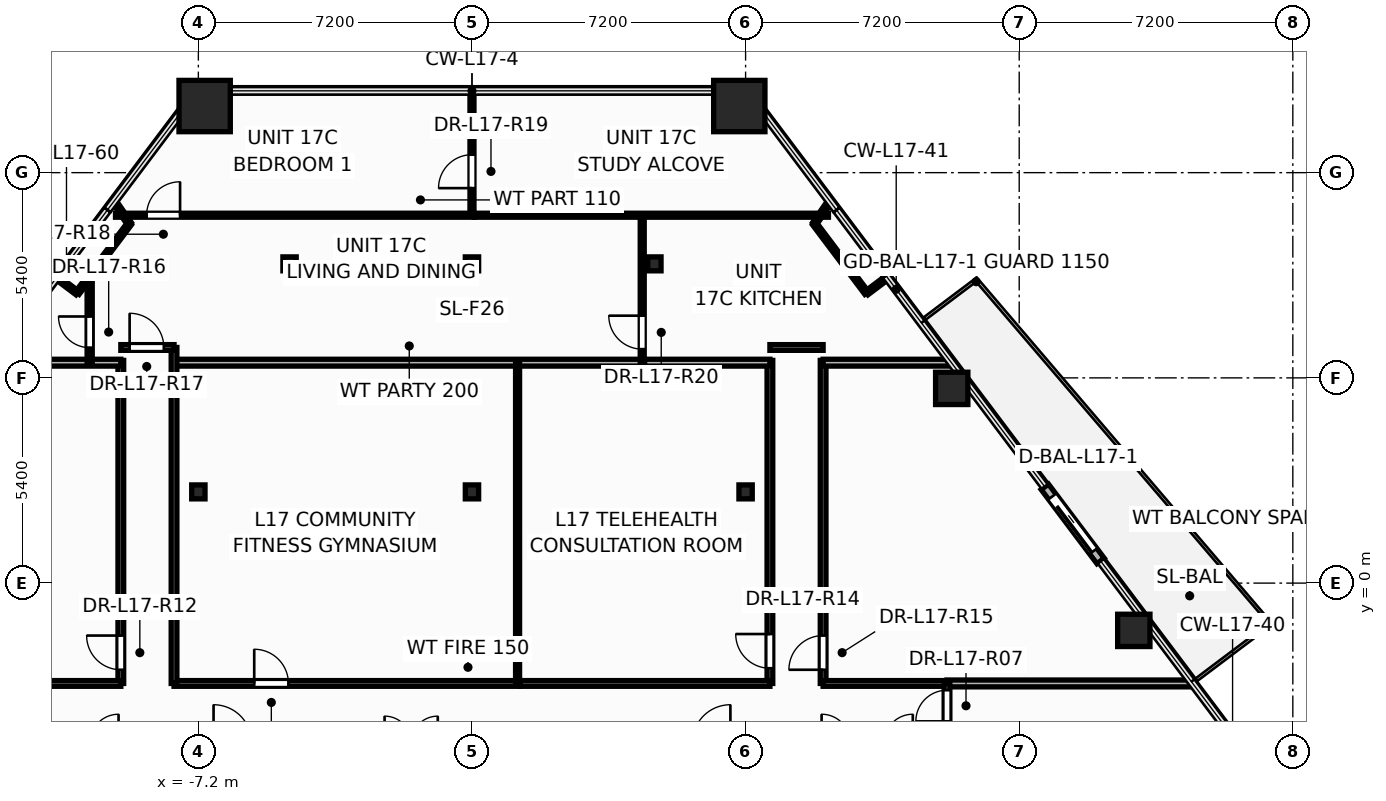
"""IFC4 building model, lengths in metres.
Left out: names, types, materials, properties, quantities, classifications, styles, units other than length and angle.
Written with IfcOpenShell. Run it as: python <this file> out.ifc"""

import sys

from ifc_helpers import new_model, si_unit, direction, frame, frame_2d, origin, origin_2d, place, context, subcontext, project, spatial, rectangle, hollow_rectangle, hollow_circle, i_section, extrude, element, fill, save


model = new_model("IFC4")
c1 = context("Model", 3, precision=1e-05, world=origin(), true_north=direction((0.0, 1.0)))
c2 = subcontext(c1, "Body", "Model", "MODEL_VIEW")
j1 = project(units=[si_unit("LENGTHUNIT", "METRE"), si_unit("PLANEANGLEUNIT", "RADIAN")], contexts=[c1])
p1 = place(None, origin())
s1 = spatial("IfcSite", under=j1, at=p1, CompositionType="ELEMENT")
p2 = place(p1, origin())
s2 = spatial("IfcBuilding", under=s1, at=p2, CompositionType="ELEMENT")
p3 = place(p2, frame((0.0, 0.0, 68.4)))
s3 = spatial("IfcBuildingStorey", under=s2, at=p3, CompositionType="ELEMENT", Elevation=68.4)
for number, where, z_axis, x_axis in (
    (1, (7.034, 12.553, 0.0), (0.0, 0.0, 1.0), (1.0, 0.0, 0.0)),
    (2, (-7.034, 12.553, 0.0), (0.0, 0.0, 1.0), (1.0, 0.0, 0.0)),
):
    element("IfcColumn", number, at=place(p3, frame(where, z_axis=z_axis, x_axis=x_axis)), inside=s3, PredefinedType="COLUMN", context=c2, shape_type="SweptSolid", body=[
        extrude(hollow_rectangle(XDim=1.35, YDim=1.35, WallThickness=0.065, at=origin_2d()), origin(), (0.0, 0.0, 1.0), 3.6),
    ])
for number, where, z_axis, x_axis in (
    (3, (17.416, -1.244, 0.0), (0.0, 0.0, 1.0), (1.0, 0.0, 0.0)),
    (4, (12.624, 5.124, 0.0), (0.0, 0.0, 1.0), (1.0, 0.0, 0.0)),
):
    element("IfcColumn", number, at=place(p3, frame(where, z_axis=z_axis, x_axis=x_axis)), inside=s3, PredefinedType="COLUMN", context=c2, shape_type="SweptSolid", body=[
        extrude(hollow_circle(Radius=0.425, WallThickness=0.038, at=origin_2d()), origin(), (0.0, 0.0, 1.0), 3.6),
    ])
for number, where, z_axis, x_axis in (
    (5, (-7.2, 2.4, 0.0), (0.0, 0.0, 1.0), (1.0, 0.0, 0.0)),
    (6, (0.0, 2.4, 0.0), (0.0, 0.0, 1.0), (1.0, 0.0, 0.0)),
    (7, (7.2, 2.4, 0.0), (0.0, 0.0, 1.0), (1.0, 0.0, 0.0)),
    (8, (-4.8, 8.4, 0.0), (0.0, 0.0, 1.0), (1.0, 0.0, 0.0)),
    (9, (0.0, 8.4, 0.0), (0.0, 0.0, 1.0), (1.0, 0.0, 0.0)),
    (10, (4.8, 8.4, 0.0), (0.0, 0.0, 1.0), (1.0, 0.0, 0.0)),
):
    element("IfcColumn", number, at=place(p3, frame(where, z_axis=z_axis, x_axis=x_axis)), inside=s3, PredefinedType="COLUMN", context=c2, shape_type="SweptSolid", body=[
        extrude(i_section(OverallWidth=0.35, OverallDepth=0.367, WebThickness=0.025, FlangeThickness=0.032, at=origin_2d()), origin(), (0.0, 0.0, 1.0), 3.6),
    ])
p4 = place(p3, frame((16.542, 0.583, -0.015), z_axis=(0.0, 0.0, 1.0), x_axis=(-0.601247991813, 0.799062483377, 0.0)))
e11 = element("IfcWall", 11, at=p4, inside=s3, PredefinedType="STANDARD", context=c2, shape_type="SweptSolid", body=[
    extrude(rectangle(XDim=2.44, YDim=0.24, at=frame_2d((1.22, 0.0))), origin(), (0.0, 0.0, 1.0), 2.728),
])
p5 = place(p4, frame((0.32, 0.0, 0.015)))
e12 = element("IfcOpeningElement", 12, at=p5, cuts=e11, PredefinedType="OPENING", context=c2, shape_type="SweptSolid", body=[
    extrude(rectangle(XDim=1.806, YDim=2.204, at=frame_2d((0.9, 1.102))), frame((0.0, 0.13, 0.0), z_axis=(0.0, -1.0, 0.0), x_axis=(1.0, 0.0, 0.0)), (0.0, 0.0, 1.0), 0.26),
])
p6 = place(p3, frame((-9.38, 9.68, 0.0), z_axis=(0.0, 0.0, 1.0), x_axis=(1.0, 0.0, 0.0)))
e13 = element("IfcWall", 13, at=p6, inside=s3, PredefinedType="PARTITIONING", context=c2, shape_type="SweptSolid", body=[
    extrude(rectangle(XDim=9.44, YDim=0.105, at=frame_2d((4.72, 0.0))), origin(), (0.0, 0.0, 1.0), 2.509),
])
p7 = place(p6, frame((0.819, 0.0, 0.0)))
e14 = element("IfcOpeningElement", 14, at=p7, cuts=e13, PredefinedType="OPENING", context=c2, shape_type="SweptSolid", body=[
    extrude(rectangle(XDim=0.886, YDim=2.104, at=frame_2d((0.44, 1.052))), frame((0.0, 0.062, 0.0), z_axis=(0.0, -1.0, 0.0), x_axis=(1.0, 0.0, 0.0)), (0.0, 0.0, 1.0), 0.125),
])
p8 = place(p3, frame((-7.84, -2.64, 0.0), z_axis=(0.0, 0.0, 1.0), x_axis=(1.0, 0.0, 0.0)))
e15 = element("IfcWall", 15, at=p8, inside=s3, PredefinedType="PARTITIONING", context=c2, shape_type="SweptSolid", body=[
    extrude(rectangle(XDim=9.1, YDim=0.15, at=frame_2d((4.55, 0.0))), origin(), (0.0, 0.0, 1.0), 2.325),
])
p9 = place(p8, frame((2.11, 0.0, 0.0)))
e16 = element("IfcOpeningElement", 16, at=p9, cuts=e15, PredefinedType="OPENING", context=c2, shape_type="SweptSolid", body=[
    extrude(rectangle(XDim=0.906, YDim=2.104, at=frame_2d((0.45, 1.052))), frame((0.0, 0.085, 0.0), z_axis=(0.0, -1.0, 0.0), x_axis=(1.0, 0.0, 0.0)), (0.0, 0.0, 1.0), 0.17),
])
p10 = place(p3, frame((-7.84, 5.8, 0.0), z_axis=(0.0, 0.0, 1.0), x_axis=(1.0, 0.0, 0.0)))
e17 = element("IfcWall", 17, at=p10, inside=s3, PredefinedType="PARTITIONING", context=c2, shape_type="SweptSolid", body=[
    extrude(rectangle(XDim=12.38, YDim=0.18, at=frame_2d((6.19, 0.0))), origin(), (0.0, 0.0, 1.0), 2.325),
])
p11 = place(p3, frame((-9.24, -2.64, 0.0), z_axis=(0.0, 0.0, 1.0), x_axis=(0.0, 1.0, 0.0)))
e18 = element("IfcWall", 18, at=p11, inside=s3, PredefinedType="PARTITIONING", context=c2, shape_type="SweptSolid", body=[
    extrude(rectangle(XDim=8.5, YDim=0.15, at=frame_2d((4.25, 0.0))), origin(), (0.0, 0.0, 1.0), 2.509),
])
p12 = place(p11, frame((0.36, 0.0, 0.0)))
e19 = element("IfcOpeningElement", 19, at=p12, cuts=e18, PredefinedType="OPENING", context=c2, shape_type="SweptSolid", body=[
    extrude(rectangle(XDim=0.906, YDim=2.104, at=frame_2d((0.45, 1.052))), frame((0.0, 0.085, 0.0), z_axis=(0.0, -1.0, 0.0), x_axis=(1.0, 0.0, 0.0)), (0.0, 0.0, 1.0), 0.17),
])
p13 = place(p3, frame((-7.84, -2.64, 0.0), z_axis=(0.0, 0.0, 1.0), x_axis=(0.0, 1.0, 0.0)))
e20 = element("IfcWall", 20, at=p13, inside=s3, PredefinedType="PARTITIONING", context=c2, shape_type="SweptSolid", body=[
    extrude(rectangle(XDim=8.84, YDim=0.15, at=frame_2d((4.42, 0.0))), origin(), (0.0, 0.0, 1.0), 2.509),
])
p14 = place(p3, frame((7.84, -2.64, 0.0), z_axis=(0.0, 0.0, 1.0), x_axis=(0.0, 1.0, 0.0)))
e21 = element("IfcWall", 21, at=p14, inside=s3, PredefinedType="PARTITIONING", context=c2, shape_type="SweptSolid", body=[
    extrude(rectangle(XDim=8.5, YDim=0.15, at=frame_2d((4.25, 0.0))), origin(), (0.0, 0.0, 1.0), 2.509),
])
p15 = place(p14, frame((0.4, 0.0, 0.0)))
e22 = element("IfcOpeningElement", 22, at=p15, cuts=e21, PredefinedType="OPENING", context=c2, shape_type="SweptSolid", body=[
    extrude(rectangle(XDim=0.906, YDim=2.104, at=frame_2d((0.45, 1.052))), frame((0.0, 0.085, 0.0), z_axis=(0.0, -1.0, 0.0), x_axis=(1.0, 0.0, 0.0)), (0.0, 0.0, 1.0), 0.17),
])
p16 = place(p3, frame((9.24, -2.64, 0.0), z_axis=(0.0, 0.0, 1.0), x_axis=(0.0, 1.0, 0.0)))
e23 = element("IfcWall", 23, at=p16, inside=s3, PredefinedType="PARTITIONING", context=c2, shape_type="SweptSolid", body=[
    extrude(rectangle(XDim=8.5, YDim=0.15, at=frame_2d((4.25, 0.0))), origin(), (0.0, 0.0, 1.0), 2.509),
])
p17 = place(p16, frame((0.36, 0.0, 0.0)))
e24 = element("IfcOpeningElement", 24, at=p17, cuts=e23, PredefinedType="OPENING", context=c2, shape_type="SweptSolid", body=[
    extrude(rectangle(XDim=0.906, YDim=2.104, at=frame_2d((0.45, 1.052))), frame((0.0, 0.085, 0.0), z_axis=(0.0, -1.0, 0.0), x_axis=(1.0, 0.0, 0.0)), (0.0, 0.0, 1.0), 0.17),
])
p18 = place(p3, frame((1.2, -2.64, 0.0), z_axis=(0.0, 0.0, 1.0), x_axis=(0.0, 1.0, 0.0)))
e25 = element("IfcWall", 25, at=p18, inside=s3, PredefinedType="PARTITIONING", context=c2, shape_type="SweptSolid", body=[
    extrude(rectangle(XDim=8.44, YDim=0.105, at=frame_2d((4.22, 0.0))), origin(), (0.0, 0.0, 1.0), 2.325),
])
p19 = place(p3, frame((1.262, -2.64, 0.0), z_axis=(0.0, 0.0, 1.0), x_axis=(1.0, 0.0, 0.0)))
e26 = element("IfcWall", 26, at=p19, inside=s3, PredefinedType="PARTITIONING", context=c2, shape_type="SweptSolid", body=[
    extrude(rectangle(XDim=6.578, YDim=0.15, at=frame_2d((3.289, 0.0))), origin(), (0.0, 0.0, 1.0), 2.325),
])
p20 = place(p3, frame((12.5, -2.64, 0.0), z_axis=(0.0, 0.0, 1.0), x_axis=(1.0, 0.0, 0.0)))
e27 = element("IfcWall", 27, at=p20, inside=s3, PredefinedType="PARTITIONING", context=c2, shape_type="SweptSolid", body=[
    extrude(rectangle(XDim=6.467, YDim=0.18, at=frame_2d((3.233, 0.0))), origin(), (0.0, 0.0, 1.0), 2.713),
])
p21 = place(p3, frame((0.062, 9.68, 0.0), z_axis=(0.0, 0.0, 1.0), x_axis=(1.0, 0.0, 0.0)))
e28 = element("IfcWall", 28, at=p21, inside=s3, PredefinedType="PARTITIONING", context=c2, shape_type="SweptSolid", body=[
    extrude(rectangle(XDim=9.318, YDim=0.105, at=frame_2d((4.659, 0.0))), origin(), (0.0, 0.0, 1.0), 2.509),
])
p22 = place(p3, frame((4.48, 5.8, 0.0), z_axis=(0.0, 0.0, 1.0), x_axis=(0.0, 1.0, 0.0)))
e29 = element("IfcWall", 29, at=p22, inside=s3, PredefinedType="PARTITIONING", context=c2, shape_type="SweptSolid", body=[
    extrude(rectangle(XDim=3.88, YDim=0.105, at=frame_2d((1.94, 0.0))), origin(), (0.0, 0.0, 1.0), 2.509),
])
p23 = place(p22, frame((0.357, 0.0, 0.0)))
e30 = element("IfcOpeningElement", 30, at=p23, cuts=e29, PredefinedType="OPENING", context=c2, shape_type="SweptSolid", body=[
    extrude(rectangle(XDim=0.886, YDim=2.104, at=frame_2d((0.44, 1.052))), frame((0.0, 0.062, 0.0), z_axis=(0.0, -1.0, 0.0), x_axis=(1.0, 0.0, 0.0)), (0.0, 0.0, 1.0), 0.125),
])
p24 = place(p3, frame((4.542, 5.8, 0.0), z_axis=(0.0, 0.0, 1.0), x_axis=(1.0, 0.0, 0.0)))
e31 = element("IfcWall", 31, at=p24, inside=s3, PredefinedType="PARTITIONING", context=c2, shape_type="SweptSolid", body=[
    extrude(rectangle(XDim=3.298, YDim=0.18, at=frame_2d((1.649, 0.0))), origin(), (0.0, 0.0, 1.0), 2.509),
])
p25 = place(p3, frame((9.24, 5.8, 0.0), z_axis=(0.0, 0.0, 1.0), x_axis=(1.0, 0.0, 0.0)))
e32 = element("IfcWall", 32, at=p25, inside=s3, PredefinedType="PARTITIONING", context=c2, shape_type="SweptSolid", body=[
    extrude(rectangle(XDim=3.376, YDim=0.18, at=frame_2d((1.688, 0.0))), origin(), (0.0, 0.0, 1.0), 2.509),
])
p26 = place(p3, frame((0.0, 9.68, 0.0), z_axis=(0.0, 0.0, 1.0), x_axis=(0.0, 1.0, 0.0)))
e33 = element("IfcWall", 33, at=p26, inside=s3, PredefinedType="PARTITIONING", context=c2, shape_type="SweptSolid", body=[
    extrude(rectangle(XDim=3.273, YDim=0.105, at=frame_2d((1.636, 0.0))), origin(), (0.0, 0.0, 1.0), 2.713),
])
p27 = place(p26, frame((0.713, 0.0, 0.0)))
e34 = element("IfcOpeningElement", 34, at=p27, cuts=e33, PredefinedType="OPENING", context=c2, shape_type="SweptSolid", body=[
    extrude(rectangle(XDim=0.886, YDim=2.104, at=frame_2d((0.44, 1.052))), frame((0.0, 0.062, 0.0), z_axis=(0.0, -1.0, 0.0), x_axis=(1.0, 0.0, 0.0)), (0.0, 0.0, 1.0), 0.125),
])
for number, where, z_axis, x_axis in (
    (35, (-12.5, -2.64, 0.0), (0.0, 0.0, 1.0), (1.0, 0.0, 0.0)),
    (36, (9.24, -2.64, 0.0), (0.0, 0.0, 1.0), (1.0, 0.0, 0.0)),
):
    element("IfcWall", number, at=place(p3, frame(where, z_axis=z_axis, x_axis=x_axis)), inside=s3, PredefinedType="PARTITIONING", context=c2, shape_type="SweptSolid", body=[
        extrude(rectangle(XDim=3.26, YDim=0.15, at=frame_2d((1.63, 0.0))), origin(), (0.0, 0.0, 1.0), 3.35),
    ])
p28 = place(p3, frame((-12.616, 5.8, 0.0), z_axis=(0.0, 0.0, 1.0), x_axis=(1.0, 0.0, 0.0)))
e37 = element("IfcWall", 37, at=p28, inside=s3, PredefinedType="PARTITIONING", context=c2, shape_type="SweptSolid", body=[
    extrude(rectangle(XDim=3.376, YDim=0.18, at=frame_2d((1.688, 0.0))), origin(), (0.0, 0.0, 1.0), 2.509),
])
p29 = place(p3, frame((-10.06, 5.8, 0.0), z_axis=(0.0, 0.0, 1.0), x_axis=(0.0, 1.0, 0.0)))
e38 = element("IfcWall", 38, at=p29, inside=s3, PredefinedType="PARTITIONING", context=c2, shape_type="SweptSolid", body=[
    extrude(rectangle(XDim=2.5, YDim=0.135, at=frame_2d((1.25, 0.0))), origin(), (0.0, 0.0, 1.0), 2.509),
])
p30 = place(p29, frame((0.396, 0.0, 0.0)))
e39 = element("IfcOpeningElement", 39, at=p30, cuts=e38, PredefinedType="OPENING", context=c2, shape_type="SweptSolid", body=[
    extrude(rectangle(XDim=0.826, YDim=2.104, at=frame_2d((0.41, 1.052))), frame((0.0, 0.078, 0.0), z_axis=(0.0, -1.0, 0.0), x_axis=(1.0, 0.0, 0.0)), (0.0, 0.0, 1.0), 0.155),
])
for number, where, z_axis, x_axis in (
    (40, (-9.014, 9.456, 0.0), (0.0, 0.0, 1.0), (-0.601, -0.799, 0.0)),
    (41, (10.385, 7.635, 0.0), (0.0, 0.0, 1.0), (-0.601, 0.799, 0.0)),
):
    element("IfcWall", number, at=place(p3, frame(where, z_axis=z_axis, x_axis=x_axis)), inside=s3, PredefinedType="PARTITIONING", context=c2, shape_type="SweptSolid", body=[
        extrude(rectangle(XDim=2.28, YDim=0.12, at=frame_2d((1.14, 0.0))), origin(), (0.0, 0.0, 1.0), 3.35),
    ])
p31 = place(p3, frame((12.5, -4.24, 0.0), z_axis=(0.0, 0.0, 1.0), x_axis=(0.0, 1.0, 0.0)))
e42 = element("IfcWall", 42, at=p31, inside=s3, PredefinedType="PARTITIONING", context=c2, shape_type="SweptSolid", body=[
    extrude(rectangle(XDim=1.6, YDim=0.15, at=frame_2d((0.8, 0.0))), origin(), (0.0, 0.0, 1.0), 2.325),
])
p32 = place(p31, frame((0.602, 0.0, 0.0)))
e43 = element("IfcOpeningElement", 43, at=p32, cuts=e42, PredefinedType="OPENING", context=c2, shape_type="SweptSolid", body=[
    extrude(rectangle(XDim=0.826, YDim=2.104, at=frame_2d((0.41, 1.052))), frame((0.0, 0.085, 0.0), z_axis=(0.0, -1.0, 0.0), x_axis=(1.0, 0.0, 0.0)), (0.0, 0.0, 1.0), 0.17),
])
p33 = place(p3, frame((-9.24, 6.2, 0.0), z_axis=(0.0, 0.0, 1.0), x_axis=(1.0, 0.0, 0.0)))
e44 = element("IfcWall", 44, at=p33, inside=s3, PredefinedType="PARTITIONING", context=c2, shape_type="SweptSolid", body=[
    extrude(rectangle(XDim=1.4, YDim=0.15, at=frame_2d((0.7, 0.0))), origin(), (0.0, 0.0, 1.0), 3.35),
])
p34 = place(p33, frame((0.231, 0.0, 0.0)))
e45 = element("IfcOpeningElement", 45, at=p34, cuts=e44, PredefinedType="OPENING", context=c2, shape_type="SweptSolid", body=[
    extrude(rectangle(XDim=0.906, YDim=2.104, at=frame_2d((0.45, 1.052))), frame((0.0, 0.085, 0.0), z_axis=(0.0, -1.0, 0.0), x_axis=(1.0, 0.0, 0.0)), (0.0, 0.0, 1.0), 0.17),
])
p35 = place(p3, frame((7.84, 6.2, 0.0), z_axis=(0.0, 0.0, 1.0), x_axis=(1.0, 0.0, 0.0)))
e46 = element("IfcWall", 46, at=p35, inside=s3, PredefinedType="PARTITIONING", context=c2, shape_type="SweptSolid", body=[
    extrude(rectangle(XDim=1.4, YDim=0.15, at=frame_2d((0.7, 0.0))), origin(), (0.0, 0.0, 1.0), 3.35),
])
for number, where, z_axis, x_axis in (
    (47, (-9.415, 10.038, 0.0), (0.0, 0.0, 1.0), (0.567, -0.824, 0.0)),
    (48, (9.014, 9.456, 0.0), (0.0, 0.0, 1.0), (0.567, 0.824, 0.0)),
):
    element("IfcWall", number, at=place(p3, frame(where, z_axis=z_axis, x_axis=x_axis)), inside=s3, PredefinedType="PARTITIONING", context=c2, shape_type="SweptSolid", body=[
        extrude(rectangle(XDim=0.706, YDim=0.12, at=frame_2d((0.353, 0.0))), origin(), (0.0, 0.0, 1.0), 2.713),
    ])
for number, where, z_axis, x_axis in (
    (49, (-10.385, 7.635, 0.0), (0.0, 0.0, 1.0), (-0.799, 0.601, 0.0)),
    (50, (10.92, 8.038, 0.0), (0.0, 0.0, 1.0), (-0.799, -0.601, 0.0)),
):
    element("IfcWall", number, at=place(p3, frame(where, z_axis=z_axis, x_axis=x_axis)), inside=s3, PredefinedType="PARTITIONING", context=c2, shape_type="SweptSolid", body=[
        extrude(rectangle(XDim=0.67, YDim=0.12, at=frame_2d((0.335, 0.0))), origin(), (0.0, 0.0, 1.0), 2.713),
    ])
p36 = place(p5, origin())
e51 = element("IfcDoor", 51, at=p36, inside=s3, OperationType="SLIDING_TO_LEFT", PredefinedType="DOOR", context=c2, shape_type="SweptSolid", body=[
    extrude(rectangle(XDim=1.8, YDim=2.2, at=frame_2d((0.9, 1.1))), frame((0.0, 0.025, 0.0), z_axis=(0.0, -1.0, 0.0), x_axis=(1.0, 0.0, 0.0)), (0.0, 0.0, 1.0), 0.05),
])
fill(e12, e51)
p37 = place(p32, origin())
e52 = element("IfcDoor", 52, at=p37, inside=s3, OperationType="SINGLE_SWING_LEFT", PredefinedType="DOOR", context=c2, shape_type="SweptSolid", body=[
    extrude(rectangle(XDim=0.82, YDim=2.1, at=frame_2d((0.41, 1.05))), frame((0.0, 0.025, 0.0), z_axis=(0.0, -1.0, 0.0), x_axis=(1.0, 0.0, 0.0)), (0.0, 0.0, 1.0), 0.05),
])
fill(e43, e52)
p38 = place(p12, origin())
e53 = element("IfcDoor", 53, at=p38, inside=s3, OperationType="SINGLE_SWING_RIGHT", PredefinedType="DOOR", context=c2, shape_type="SweptSolid", body=[
    extrude(rectangle(XDim=0.9, YDim=2.1, at=frame_2d((0.45, 1.05))), frame((0.0, 0.025, 0.0), z_axis=(0.0, -1.0, 0.0), x_axis=(1.0, 0.0, 0.0)), (0.0, 0.0, 1.0), 0.05),
])
fill(e19, e53)
p39 = place(p9, origin())
e54 = element("IfcDoor", 54, at=p39, inside=s3, OperationType="SINGLE_SWING_LEFT", PredefinedType="DOOR", context=c2, shape_type="SweptSolid", body=[
    extrude(rectangle(XDim=0.9, YDim=2.1, at=frame_2d((0.45, 1.05))), frame((0.0, 0.025, 0.0), z_axis=(0.0, -1.0, 0.0), x_axis=(1.0, 0.0, 0.0)), (0.0, 0.0, 1.0), 0.05),
])
fill(e16, e54)
p40 = place(p15, origin())
e55 = element("IfcDoor", 55, at=p40, inside=s3, OperationType="SINGLE_SWING_RIGHT", PredefinedType="DOOR", context=c2, shape_type="SweptSolid", body=[
    extrude(rectangle(XDim=0.9, YDim=2.1, at=frame_2d((0.45, 1.05))), frame((0.0, 0.025, 0.0), z_axis=(0.0, -1.0, 0.0), x_axis=(1.0, 0.0, 0.0)), (0.0, 0.0, 1.0), 0.05),
])
fill(e22, e55)
p41 = place(p17, origin())
e56 = element("IfcDoor", 56, at=p41, inside=s3, OperationType="SINGLE_SWING_LEFT", PredefinedType="DOOR", context=c2, shape_type="SweptSolid", body=[
    extrude(rectangle(XDim=0.9, YDim=2.1, at=frame_2d((0.45, 1.05))), frame((0.0, 0.025, 0.0), z_axis=(0.0, -1.0, 0.0), x_axis=(1.0, 0.0, 0.0)), (0.0, 0.0, 1.0), 0.05),
])
fill(e24, e56)
p42 = place(p30, origin())
e57 = element("IfcDoor", 57, at=p42, inside=s3, OperationType="SINGLE_SWING_RIGHT", PredefinedType="DOOR", context=c2, shape_type="SweptSolid", body=[
    extrude(rectangle(XDim=0.82, YDim=2.1, at=frame_2d((0.41, 1.05))), frame((0.0, 0.025, 0.0), z_axis=(0.0, -1.0, 0.0), x_axis=(1.0, 0.0, 0.0)), (0.0, 0.0, 1.0), 0.05),
])
fill(e39, e57)
p43 = place(p34, origin())
e58 = element("IfcDoor", 58, at=p43, inside=s3, OperationType="SINGLE_SWING_LEFT", PredefinedType="DOOR", context=c2, shape_type="SweptSolid", body=[
    extrude(rectangle(XDim=0.9, YDim=2.1, at=frame_2d((0.45, 1.05))), frame((0.0, 0.025, 0.0), z_axis=(0.0, -1.0, 0.0), x_axis=(1.0, 0.0, 0.0)), (0.0, 0.0, 1.0), 0.05),
])
fill(e45, e58)
p44 = place(p7, origin())
e59 = element("IfcDoor", 59, at=p44, inside=s3, OperationType="SINGLE_SWING_RIGHT", PredefinedType="DOOR", context=c2, shape_type="SweptSolid", body=[
    extrude(rectangle(XDim=0.88, YDim=2.1, at=frame_2d((0.44, 1.05))), frame((0.0, 0.025, 0.0), z_axis=(0.0, -1.0, 0.0), x_axis=(1.0, 0.0, 0.0)), (0.0, 0.0, 1.0), 0.05),
])
fill(e14, e59)
p45 = place(p27, origin())
e60 = element("IfcDoor", 60, at=p45, inside=s3, OperationType="SINGLE_SWING_LEFT", PredefinedType="DOOR", context=c2, shape_type="SweptSolid", body=[
    extrude(rectangle(XDim=0.88, YDim=2.1, at=frame_2d((0.44, 1.05))), frame((0.0, 0.025, 0.0), z_axis=(0.0, -1.0, 0.0), x_axis=(1.0, 0.0, 0.0)), (0.0, 0.0, 1.0), 0.05),
])
fill(e34, e60)
p46 = place(p23, origin())
e61 = element("IfcDoor", 61, at=p46, inside=s3, OperationType="SINGLE_SWING_RIGHT", PredefinedType="DOOR", context=c2, shape_type="SweptSolid", body=[
    extrude(rectangle(XDim=0.88, YDim=2.1, at=frame_2d((0.44, 1.05))), frame((0.0, 0.025, 0.0), z_axis=(0.0, -1.0, 0.0), x_axis=(1.0, 0.0, 0.0)), (0.0, 0.0, 1.0), 0.05),
])
fill(e30, e61)
save(model, sys.argv[1])
